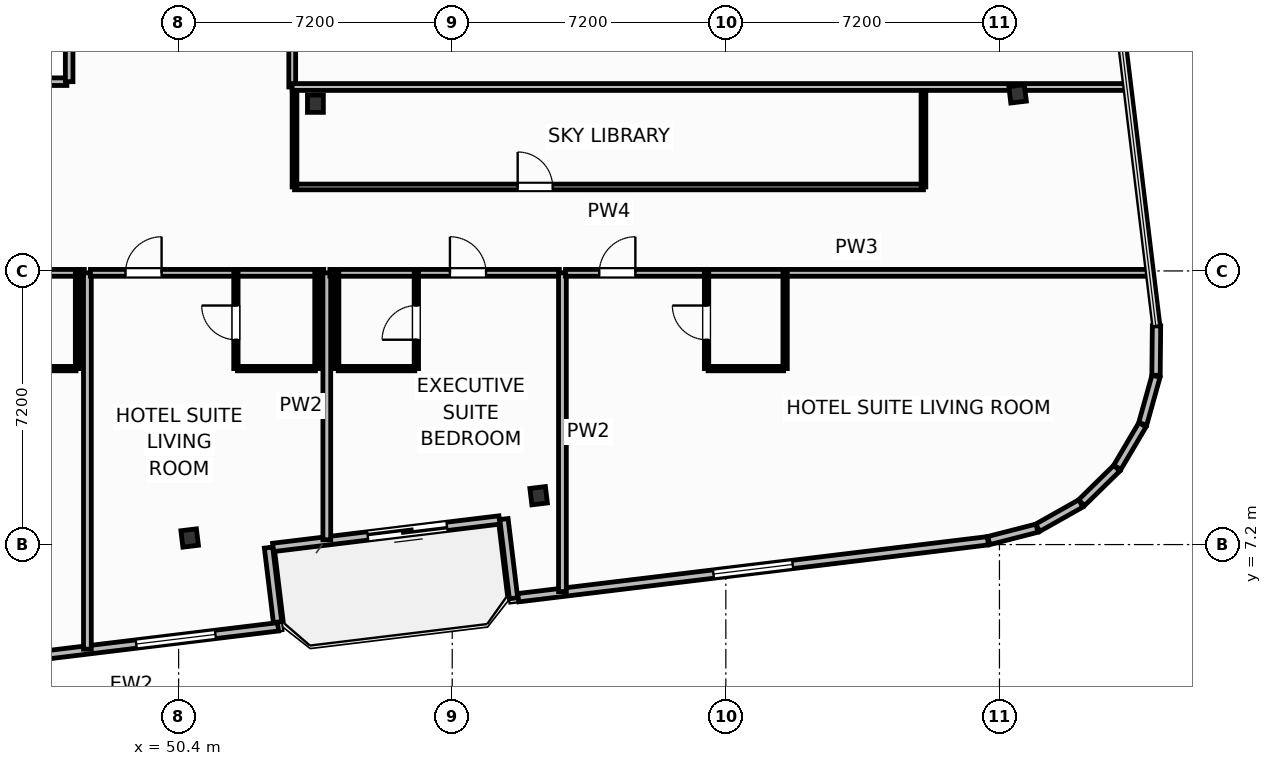
"""IFC4 building model, lengths in metres.
Left out: names, types, materials, properties, quantities, classifications, styles, units other than length and angle.
Written with IfcOpenShell. Run it as: python <this file> out.ifc"""

import sys

from ifc_helpers import new_model, si_unit, direction, frame, frame_2d, origin, origin_2d, place, context, subcontext, project, spatial, rectangle, i_section, extrude, element, fill, save


model = new_model("IFC4")
c1 = context("Model", 3, precision=1e-05, world=origin(), true_north=direction((0.0, 1.0)))
c2 = subcontext(c1, "Body", "Model", "MODEL_VIEW")
j1 = project(units=[si_unit("LENGTHUNIT", "METRE"), si_unit("PLANEANGLEUNIT", "RADIAN")], contexts=[c1])
p1 = place(None, origin())
s1 = spatial("IfcSite", under=j1, at=p1, CompositionType="ELEMENT")
p2 = place(p1, origin())
s2 = spatial("IfcBuilding", under=s1, at=p2, CompositionType="ELEMENT")
p3 = place(p2, frame((0.0, 0.0, 200.5)))
s3 = spatial("IfcBuildingStorey", under=s2, at=p3, CompositionType="ELEMENT", Elevation=200.5)
p4 = place(p3, frame((54.0, 18.8, 0.0), z_axis=(0.0, 0.0, 1.0), x_axis=(1.0, 0.0, 0.0)))
e1 = element("IfcColumn", 1, at=p4, inside=s3, PredefinedType="COLUMN", context=c2, shape_type="SweptSolid", body=[
    extrude(i_section(OverallWidth=0.418, OverallDepth=0.455, WebThickness=0.042, FlangeThickness=0.068, FilletRadius=0.025, at=origin_2d()), origin(), (0.0, 0.0, 1.0), 3.7),
])
for number, where, z_axis, x_axis in (
    (2, (50.691, 7.373, 0.0), (0.0, 0.0, 1.0), (0.993, 0.12, 0.0)),
    (3, (59.874, 8.486, 0.0), (0.0, 0.0, 1.0), (0.993, 0.12, 0.0)),
    (4, (72.477, 19.059, 0.0), (0.0, 0.0, 1.0), (0.993, 0.12, 0.0)),
):
    element("IfcColumn", number, at=place(p3, frame(where, z_axis=z_axis, x_axis=x_axis)), inside=s3, PredefinedType="COLUMN", context=c2, shape_type="SweptSolid", body=[
        extrude(i_section(OverallWidth=0.412, OverallDepth=0.435, WebThickness=0.036, FlangeThickness=0.057, FilletRadius=0.025, at=origin_2d()), origin(), (0.0, 0.0, 1.0), 3.7),
    ])
p5 = place(p3, frame((58.843, 7.847, 0.0), z_axis=(0.0, 0.0, 1.0), x_axis=(-0.992729951822, -0.120362962556, 0.0)))
e5 = element("IfcWall", 5, at=p5, inside=s3, PredefinedType="SOLIDWALL", context=c2, shape_type="SweptSolid", body=[
    extrude(rectangle(XDim=6.0, YDim=0.22, at=frame_2d((3.0, 0.0))), origin(), (0.0, 0.0, 1.0), 2.73),
])
p6 = place(p5, frame((1.392, 0.0, 0.0)))
e6 = element("IfcOpeningElement", 6, at=p6, cuts=e5, PredefinedType="OPENING", context=c2, shape_type="SweptSolid", body=[
    extrude(rectangle(XDim=2.1, YDim=2.3, at=frame_2d((1.05, 1.15))), frame((0.0, 0.12, 0.0), z_axis=(0.0, -1.0, 0.0), x_axis=(1.0, 0.0, 0.0)), (0.0, 0.0, 1.0), 0.24),
])
p7 = place(p3, frame((45.042, 4.069, 0.0), z_axis=(0.0, 0.0, 1.0), x_axis=(0.992731032022, 0.120354052946, 0.0)))
e7 = element("IfcWall", 7, at=p7, inside=s3, PredefinedType="SOLIDWALL", context=c2, shape_type="SweptSolid", body=[
    extrude(rectangle(XDim=8.035, YDim=0.22, at=frame_2d((4.018, 0.0))), origin(), (0.0, 0.0, 1.0), 2.73),
])
p8 = place(p7, frame((4.273, 0.0, 0.8)))
e8 = element("IfcOpeningElement", 8, at=p8, cuts=e7, PredefinedType="OPENING", context=c2, shape_type="SweptSolid", body=[
    extrude(rectangle(XDim=2.1, YDim=1.75, at=frame_2d((1.05, 0.875))), frame((0.0, 0.12, 0.0), z_axis=(0.0, -1.0, 0.0), x_axis=(1.0, 0.0, 0.0)), (0.0, 0.0, 1.0), 0.24),
])
p9 = place(p3, frame((53.004, 5.16, 0.0), z_axis=(0.0, 0.0, 1.0), x_axis=(-0.120397815541, 0.992725725472, 0.0)))
e9 = element("IfcWall", 9, at=p9, inside=s3, PredefinedType="SOLIDWALL", context=c2, shape_type="SweptSolid", body=[
    extrude(rectangle(XDim=1.975, YDim=0.22, at=frame_2d((0.988, 0.0))), origin(), (0.0, 0.0, 1.0), 2.73),
])
p10 = place(p3, frame((58.961, 7.872, 0.0), z_axis=(0.0, 0.0, 1.0), x_axis=(0.120327895535, -0.992734202874, 0.0)))
e10 = element("IfcWall", 10, at=p10, inside=s3, PredefinedType="SOLIDWALL", context=c2, shape_type="SweptSolid", body=[
    extrude(rectangle(XDim=2.1, YDim=0.22, at=frame_2d((1.05, 0.0))), origin(), (0.0, 0.0, 1.0), 2.73),
])
p11 = place(p3, frame((59.338, 5.802, 0.0), z_axis=(0.0, 0.0, 1.0), x_axis=(0.992731225757, 0.120352454927, 0.0)))
e11 = element("IfcWall", 11, at=p11, inside=s3, PredefinedType="SOLIDWALL", context=c2, shape_type="SweptSolid", body=[
    extrude(rectangle(XDim=12.447, YDim=0.22, at=frame_2d((6.224, 0.0))), origin(), (0.0, 0.0, 1.0), 2.73),
])
p12 = place(p11, frame((5.174, 0.0, 0.8)))
e12 = element("IfcOpeningElement", 12, at=p12, cuts=e11, PredefinedType="OPENING", context=c2, shape_type="SweptSolid", body=[
    extrude(rectangle(XDim=2.1, YDim=1.75, at=frame_2d((1.05, 0.875))), frame((0.0, 0.12, 0.0), z_axis=(0.0, -1.0, 0.0), x_axis=(1.0, 0.0, 0.0)), (0.0, 0.0, 1.0), 0.24),
])
p13 = place(p3, frame((71.719, 7.306, 0.0), z_axis=(0.0, 0.0, 1.0), x_axis=(0.968541764193, 0.248851061909, 0.0)))
e13 = element("IfcWall", 13, at=p13, inside=s3, PredefinedType="SOLIDWALL", context=c2, shape_type="SweptSolid", body=[
    extrude(rectangle(XDim=1.309, YDim=0.22, at=frame_2d((0.654, 0.0))), origin(), (0.0, 0.0, 1.0), 2.73),
])
for number, where, z_axis, x_axis in (
    (14, (73.008, 7.644, 0.0), (0.0, 0.0, 1.0), (0.871, 0.491, 0.0)),
    (15, (74.159, 8.3, 0.0), (0.0, 0.0, 1.0), (0.714, 0.7, 0.0)),
    (16, (75.101, 9.232, 0.0), (0.0, 0.0, 1.0), (0.509, 0.861, 0.0)),
    (17, (75.77, 10.376, 0.0), (0.0, 0.0, 1.0), (0.269, 0.963, 0.0)),
):
    element("IfcWall", number, at=place(p3, frame(where, z_axis=z_axis, x_axis=x_axis)), inside=s3, PredefinedType="SOLIDWALL", context=c2, shape_type="SweptSolid", body=[
        extrude(rectangle(XDim=1.301, YDim=0.22, at=frame_2d((0.65, 0.0))), origin(), (0.0, 0.0, 1.0), 2.73),
    ])
p14 = place(p3, frame((76.12, 11.654, 0.0), z_axis=(0.0, 0.0, 1.0), x_axis=(0.01032033607, 0.999946743914, 0.0)))
e18 = element("IfcWall", 18, at=p14, inside=s3, PredefinedType="SOLIDWALL", context=c2, shape_type="SweptSolid", body=[
    extrude(rectangle(XDim=1.301, YDim=0.22, at=frame_2d((0.65, 0.0))), origin(), (0.0, 0.0, 1.0), 2.73),
])
p15 = place(p3, frame((53.45, 16.61, 0.0), z_axis=(0.0, 0.0, 1.0), x_axis=(1.0, 0.0, 0.0)))
e19 = element("IfcWall", 19, at=p15, inside=s3, PredefinedType="PARTITIONING", context=c2, shape_type="SweptSolid", body=[
    extrude(rectangle(XDim=16.55, YDim=0.15, at=frame_2d((8.275, 0.0))), origin(), (0.0, 0.0, 1.0), 3.45),
])
p16 = place(p15, frame((5.873, 0.0, 0.0)))
e20 = element("IfcOpeningElement", 20, at=p16, cuts=e19, PredefinedType="OPENING", context=c2, shape_type="SweptSolid", body=[
    extrude(rectangle(XDim=0.92, YDim=2.05, at=frame_2d((0.46, 1.025))), frame((0.0, 0.085, 0.0), z_axis=(0.0, -1.0, 0.0), x_axis=(1.0, 0.0, 0.0)), (0.0, 0.0, 1.0), 0.17),
])
p17 = place(p3, frame((53.45, 16.61, 0.0), z_axis=(0.0, 0.0, 1.0), x_axis=(0.0, 1.0, 0.0)))
e21 = element("IfcWall", 21, at=p17, inside=s3, PredefinedType="PARTITIONING", context=c2, shape_type="SweptSolid", body=[
    extrude(rectangle(XDim=2.63, YDim=0.125, at=frame_2d((1.315, 0.0))), origin(), (0.0, 0.0, 1.0), 2.662),
])
p18 = place(p3, frame((70.0, 16.61, 0.0), z_axis=(0.0, 0.0, 1.0), x_axis=(0.0, 1.0, 0.0)))
e22 = element("IfcWall", 22, at=p18, inside=s3, PredefinedType="PARTITIONING", context=c2, shape_type="SweptSolid", body=[
    extrude(rectangle(XDim=2.63, YDim=0.125, at=frame_2d((1.315, 0.0))), origin(), (0.0, 0.0, 1.0), 3.45),
])
p19 = place(p3, frame((41.78, 14.35, 0.0), z_axis=(0.0, 0.0, 1.0), x_axis=(1.0, 0.0, 0.0)))
e23 = element("IfcWall", 23, at=p19, inside=s3, PredefinedType="PARTITIONING", context=c2, shape_type="SweptSolid", body=[
    extrude(rectangle(XDim=6.14, YDim=0.18, at=frame_2d((3.07, 0.0))), origin(), (0.0, 0.0, 1.0), 3.45),
])
p20 = place(p19, frame((0.922, 0.0, 0.0)))
e24 = element("IfcOpeningElement", 24, at=p20, cuts=e23, PredefinedType="OPENING", context=c2, shape_type="SweptSolid", body=[
    extrude(rectangle(XDim=0.95, YDim=2.15, at=frame_2d((0.475, 1.075))), frame((0.0, 0.1, 0.0), z_axis=(0.0, -1.0, 0.0), x_axis=(1.0, 0.0, 0.0)), (0.0, 0.0, 1.0), 0.2),
])
p21 = place(p3, frame((45.648, 11.83, 0.0), z_axis=(0.0, 0.0, 1.0), x_axis=(1.0, 0.0, 0.0)))
e25 = element("IfcWall", 25, at=p21, inside=s3, PredefinedType="PARTITIONING", context=c2, shape_type="SweptSolid", body=[
    extrude(rectangle(XDim=2.052, YDim=0.115, at=frame_2d((1.026, 0.0))), origin(), (0.0, 0.0, 1.0), 3.45),
])
p22 = place(p3, frame((47.74, 11.83, 0.0), z_axis=(0.0, 0.0, 1.0), x_axis=(0.0, 1.0, 0.0)))
e26 = element("IfcWall", 26, at=p22, inside=s3, PredefinedType="PARTITIONING", context=c2, shape_type="SweptSolid", body=[
    extrude(rectangle(XDim=2.52, YDim=0.115, at=frame_2d((1.26, 0.0))), origin(), (0.0, 0.0, 1.0), 3.45),
])
p23 = place(p3, frame((48.0, 4.448, 0.0), z_axis=(0.0, 0.0, 1.0), x_axis=(0.0, 1.0, 0.0)))
e27 = element("IfcWall", 27, at=p23, inside=s3, PredefinedType="PARTITIONING", context=c2, shape_type="SweptSolid", body=[
    extrude(rectangle(XDim=9.903, YDim=0.205, at=frame_2d((4.951, 0.0))), origin(), (0.0, 0.0, 1.0), 3.45),
])
p24 = place(p3, frame((48.08, 14.35, 0.0), z_axis=(0.0, 0.0, 1.0), x_axis=(1.0, 0.0, 0.0)))
e28 = element("IfcWall", 28, at=p24, inside=s3, PredefinedType="PARTITIONING", context=c2, shape_type="SweptSolid", body=[
    extrude(rectangle(XDim=6.14, YDim=0.18, at=frame_2d((3.07, 0.0))), origin(), (0.0, 0.0, 1.0), 3.45),
])
p25 = place(p24, frame((0.922, 0.0, 0.0)))
e29 = element("IfcOpeningElement", 29, at=p25, cuts=e28, PredefinedType="OPENING", context=c2, shape_type="SweptSolid", body=[
    extrude(rectangle(XDim=0.95, YDim=2.15, at=frame_2d((0.475, 1.075))), frame((0.0, 0.1, 0.0), z_axis=(0.0, -1.0, 0.0), x_axis=(1.0, 0.0, 0.0)), (0.0, 0.0, 1.0), 0.2),
])
p26 = place(p3, frame((51.948, 11.83, 0.0), z_axis=(0.0, 0.0, 1.0), x_axis=(1.0, 0.0, 0.0)))
e30 = element("IfcWall", 30, at=p26, inside=s3, PredefinedType="PARTITIONING", context=c2, shape_type="SweptSolid", body=[
    extrude(rectangle(XDim=2.052, YDim=0.115, at=frame_2d((1.026, 0.0))), origin(), (0.0, 0.0, 1.0), 3.45),
])
p27 = place(p3, frame((51.908, 11.83, 0.0), z_axis=(0.0, 0.0, 1.0), x_axis=(0.0, 1.0, 0.0)))
e31 = element("IfcWall", 31, at=p27, inside=s3, PredefinedType="PARTITIONING", context=c2, shape_type="SweptSolid", body=[
    extrude(rectangle(XDim=2.52, YDim=0.115, at=frame_2d((1.26, 0.0))), origin(), (0.0, 0.0, 1.0), 2.662),
])
p28 = place(p27, frame((0.76, 0.0, 0.0)))
e32 = element("IfcOpeningElement", 32, at=p28, cuts=e31, PredefinedType="OPENING", context=c2, shape_type="SweptSolid", body=[
    extrude(rectangle(XDim=0.9, YDim=2.05, at=frame_2d((0.45, 1.025))), frame((0.0, 0.067, 0.0), z_axis=(0.0, -1.0, 0.0), x_axis=(1.0, 0.0, 0.0)), (0.0, 0.0, 1.0), 0.135),
])
p29 = place(p3, frame((54.04, 11.83, 0.0), z_axis=(0.0, 0.0, 1.0), x_axis=(0.0, 1.0, 0.0)))
e33 = element("IfcWall", 33, at=p29, inside=s3, PredefinedType="PARTITIONING", context=c2, shape_type="SweptSolid", body=[
    extrude(rectangle(XDim=2.52, YDim=0.115, at=frame_2d((1.26, 0.0))), origin(), (0.0, 0.0, 1.0), 3.45),
])
p30 = place(p3, frame((54.3, 7.326, 0.0), z_axis=(0.0, 0.0, 1.0), x_axis=(0.0, 1.0, 0.0)))
e34 = element("IfcWall", 34, at=p30, inside=s3, PredefinedType="PARTITIONING", context=c2, shape_type="SweptSolid", body=[
    extrude(rectangle(XDim=7.024, YDim=0.205, at=frame_2d((3.512, 0.0))), origin(), (0.0, 0.0, 1.0), 3.45),
])
p31 = place(p3, frame((54.38, 14.35, 0.0), z_axis=(0.0, 0.0, 1.0), x_axis=(1.0, 0.0, 0.0)))
e35 = element("IfcWall", 35, at=p31, inside=s3, PredefinedType="PARTITIONING", context=c2, shape_type="SweptSolid", body=[
    extrude(rectangle(XDim=6.04, YDim=0.18, at=frame_2d((3.02, 0.0))), origin(), (0.0, 0.0, 1.0), 3.45),
])
p32 = place(p31, frame((3.16, 0.0, 0.0)))
e36 = element("IfcOpeningElement", 36, at=p32, cuts=e35, PredefinedType="OPENING", context=c2, shape_type="SweptSolid", body=[
    extrude(rectangle(XDim=0.95, YDim=2.15, at=frame_2d((0.475, 1.075))), frame((0.0, 0.1, 0.0), z_axis=(0.0, -1.0, 0.0), x_axis=(1.0, 0.0, 0.0)), (0.0, 0.0, 1.0), 0.2),
])
p33 = place(p3, frame((54.6, 11.83, 0.0), z_axis=(0.0, 0.0, 1.0), x_axis=(1.0, 0.0, 0.0)))
e37 = element("IfcWall", 37, at=p33, inside=s3, PredefinedType="PARTITIONING", context=c2, shape_type="SweptSolid", body=[
    extrude(rectangle(XDim=2.016, YDim=0.115, at=frame_2d((1.008, 0.0))), origin(), (0.0, 0.0, 1.0), 3.45),
])
p34 = place(p3, frame((56.656, 11.83, 0.0), z_axis=(0.0, 0.0, 1.0), x_axis=(0.0, 1.0, 0.0)))
e38 = element("IfcWall", 38, at=p34, inside=s3, PredefinedType="PARTITIONING", context=c2, shape_type="SweptSolid", body=[
    extrude(rectangle(XDim=2.52, YDim=0.115, at=frame_2d((1.26, 0.0))), origin(), (0.0, 0.0, 1.0), 3.45),
])
p35 = place(p34, frame((0.76, 0.0, 0.0)))
e39 = element("IfcOpeningElement", 39, at=p35, cuts=e38, PredefinedType="OPENING", context=c2, shape_type="SweptSolid", body=[
    extrude(rectangle(XDim=0.9, YDim=2.05, at=frame_2d((0.45, 1.025))), frame((0.0, 0.067, 0.0), z_axis=(0.0, -1.0, 0.0), x_axis=(1.0, 0.0, 0.0)), (0.0, 0.0, 1.0), 0.135),
])
p36 = place(p3, frame((54.56, 11.83, 0.0), z_axis=(0.0, 0.0, 1.0), x_axis=(0.0, 1.0, 0.0)))
e40 = element("IfcWall", 40, at=p36, inside=s3, PredefinedType="PARTITIONING", context=c2, shape_type="SweptSolid", body=[
    extrude(rectangle(XDim=2.52, YDim=0.115, at=frame_2d((1.26, 0.0))), origin(), (0.0, 0.0, 1.0), 3.45),
])
p37 = place(p3, frame((60.5, 5.963, 0.0), z_axis=(0.0, 0.0, 1.0), x_axis=(0.0, 1.0, 0.0)))
e41 = element("IfcWall", 41, at=p37, inside=s3, PredefinedType="PARTITIONING", context=c2, shape_type="SweptSolid", body=[
    extrude(rectangle(XDim=8.387, YDim=0.205, at=frame_2d((4.194, 0.0))), origin(), (0.0, 0.0, 1.0), 3.45),
])
p38 = place(p3, frame((60.58, 14.35, 0.0), z_axis=(0.0, 0.0, 1.0), x_axis=(1.0, 0.0, 0.0)))
e42 = element("IfcWall", 42, at=p38, inside=s3, PredefinedType="PARTITIONING", context=c2, shape_type="SweptSolid", body=[
    extrude(rectangle(XDim=15.325, YDim=0.18, at=frame_2d((7.662, 0.0))), origin(), (0.0, 0.0, 1.0), 3.45),
])
p39 = place(p38, frame((0.889, 0.0, 0.0)))
e43 = element("IfcOpeningElement", 43, at=p39, cuts=e42, PredefinedType="OPENING", context=c2, shape_type="SweptSolid", body=[
    extrude(rectangle(XDim=0.95, YDim=2.15, at=frame_2d((0.475, 1.075))), frame((0.0, 0.1, 0.0), z_axis=(0.0, -1.0, 0.0), x_axis=(1.0, 0.0, 0.0)), (0.0, 0.0, 1.0), 0.2),
])
p40 = place(p3, frame((64.333, 11.83, 0.0), z_axis=(0.0, 0.0, 1.0), x_axis=(1.0, 0.0, 0.0)))
e44 = element("IfcWall", 44, at=p40, inside=s3, PredefinedType="PARTITIONING", context=c2, shape_type="SweptSolid", body=[
    extrude(rectangle(XDim=1.987, YDim=0.115, at=frame_2d((0.994, 0.0))), origin(), (0.0, 0.0, 1.0), 3.45),
])
p41 = place(p3, frame((64.293, 11.83, 0.0), z_axis=(0.0, 0.0, 1.0), x_axis=(0.0, 1.0, 0.0)))
e45 = element("IfcWall", 45, at=p41, inside=s3, PredefinedType="PARTITIONING", context=c2, shape_type="SweptSolid", body=[
    extrude(rectangle(XDim=2.52, YDim=0.115, at=frame_2d((1.26, 0.0))), origin(), (0.0, 0.0, 1.0), 3.45),
])
p42 = place(p41, frame((0.76, 0.0, 0.0)))
e46 = element("IfcOpeningElement", 46, at=p42, cuts=e45, PredefinedType="OPENING", context=c2, shape_type="SweptSolid", body=[
    extrude(rectangle(XDim=0.9, YDim=2.05, at=frame_2d((0.45, 1.025))), frame((0.0, 0.067, 0.0), z_axis=(0.0, -1.0, 0.0), x_axis=(1.0, 0.0, 0.0)), (0.0, 0.0, 1.0), 0.135),
])
p43 = place(p3, frame((66.36, 11.83, 0.0), z_axis=(0.0, 0.0, 1.0), x_axis=(0.0, 1.0, 0.0)))
e47 = element("IfcWall", 47, at=p43, inside=s3, PredefinedType="PARTITIONING", context=c2, shape_type="SweptSolid", body=[
    extrude(rectangle(XDim=2.52, YDim=0.115, at=frame_2d((1.26, 0.0))), origin(), (0.0, 0.0, 1.0), 3.45),
])
p44 = place(p3, frame((53.39, 19.24, 0.0), z_axis=(0.0, 0.0, 1.0), x_axis=(0.0, 1.0, 0.0)))
e48 = element("IfcWall", 48, at=p44, inside=s3, PredefinedType="PARTITIONING", context=c2, shape_type="SweptSolid", body=[
    extrude(rectangle(XDim=20.06, YDim=0.18, at=frame_2d((10.03, 0.0))), origin(), (0.0, 0.0, 1.0), 3.45),
])
p45 = place(p44, frame((7.7, 0.0, 0.0)))
e49 = element("IfcOpeningElement", 49, at=p45, cuts=e48, PredefinedType="OPENING", context=c2, shape_type="SweptSolid", body=[
    extrude(rectangle(XDim=0.95, YDim=2.05, at=frame_2d((0.475, 1.025))), frame((0.0, 0.1, 0.0), z_axis=(0.0, -1.0, 0.0), x_axis=(1.0, 0.0, 0.0)), (0.0, 0.0, 1.0), 0.2),
])
p46 = place(p3, frame((53.39, 19.24, 0.0), z_axis=(0.0, 0.0, 1.0), x_axis=(1.0, 0.0, 0.0)))
e50 = element("IfcWall", 50, at=p46, inside=s3, PredefinedType="PARTITIONING", context=c2, shape_type="SweptSolid", body=[
    extrude(rectangle(XDim=21.922, YDim=0.18, at=frame_2d((10.961, 0.0))), origin(), (0.0, 0.0, 1.0), 2.662),
])
p47 = place(p3, frame((45.24, 19.38, 0.0), z_axis=(0.0, 0.0, 1.0), x_axis=(1.0, 0.0, 0.0)))
e51 = element("IfcWall", 51, at=p47, inside=s3, PredefinedType="PARTITIONING", context=c2, shape_type="SweptSolid", body=[
    extrude(rectangle(XDim=2.22, YDim=0.2, at=frame_2d((1.11, 0.0))), origin(), (0.0, 0.0, 1.0), 2.662),
])
p48 = place(p3, frame((47.52, 19.38, 0.0), z_axis=(0.0, 0.0, 1.0), x_axis=(0.0, 1.0, 0.0)))
e52 = element("IfcWall", 52, at=p48, inside=s3, PredefinedType="PARTITIONING", context=c2, shape_type="SweptSolid", body=[
    extrude(rectangle(XDim=6.9, YDim=0.2, at=frame_2d((3.45, 0.0))), origin(), (0.0, 0.0, 1.0), 3.45),
])
p49 = place(p6, origin())
e53 = element("IfcDoor", 53, at=p49, inside=s3, OperationType="SLIDING_TO_LEFT", PredefinedType="DOOR", context=c2, shape_type="SweptSolid", body=[
    extrude(rectangle(XDim=2.1, YDim=2.3, at=frame_2d((1.05, 1.15))), frame((0.0, 0.025, 0.0), z_axis=(0.0, -1.0, 0.0), x_axis=(1.0, 0.0, 0.0)), (0.0, 0.0, 1.0), 0.05),
])
fill(e6, e53)
p50 = place(p8, origin())
e54 = element("IfcWindow", 54, at=p50, inside=s3, PartitioningType="SINGLE_PANEL", PredefinedType="WINDOW", context=c2, shape_type="SweptSolid", body=[
    extrude(rectangle(XDim=2.1, YDim=1.75, at=frame_2d((1.05, 0.875))), frame((0.0, 0.03, 0.0), z_axis=(0.0, -1.0, 0.0), x_axis=(1.0, 0.0, 0.0)), (0.0, 0.0, 1.0), 0.06),
])
fill(e8, e54)
p51 = place(p12, origin())
e55 = element("IfcWindow", 55, at=p51, inside=s3, PartitioningType="SINGLE_PANEL", PredefinedType="WINDOW", context=c2, shape_type="SweptSolid", body=[
    extrude(rectangle(XDim=2.1, YDim=1.75, at=frame_2d((1.05, 0.875))), frame((0.0, 0.03, 0.0), z_axis=(0.0, -1.0, 0.0), x_axis=(1.0, 0.0, 0.0)), (0.0, 0.0, 1.0), 0.06),
])
fill(e12, e55)
p52 = place(p16, origin())
e56 = element("IfcDoor", 56, at=p52, inside=s3, OperationType="SINGLE_SWING_LEFT", PredefinedType="DOOR", context=c2, shape_type="SweptSolid", body=[
    extrude(rectangle(XDim=0.92, YDim=2.05, at=frame_2d((0.46, 1.025))), frame((0.0, 0.025, 0.0), z_axis=(0.0, -1.0, 0.0), x_axis=(1.0, 0.0, 0.0)), (0.0, 0.0, 1.0), 0.05),
])
fill(e20, e56)
p53 = place(p25, origin())
e57 = element("IfcDoor", 57, at=p53, inside=s3, OperationType="SINGLE_SWING_RIGHT", PredefinedType="DOOR", context=c2, shape_type="SweptSolid", body=[
    extrude(rectangle(XDim=0.95, YDim=2.15, at=frame_2d((0.475, 1.075))), frame((0.0, 0.025, 0.0), z_axis=(0.0, -1.0, 0.0), x_axis=(1.0, 0.0, 0.0)), (0.0, 0.0, 1.0), 0.05),
])
fill(e29, e57)
p54 = place(p28, origin())
e58 = element("IfcDoor", 58, at=p54, inside=s3, OperationType="SINGLE_SWING_RIGHT", PredefinedType="DOOR", context=c2, shape_type="SweptSolid", body=[
    extrude(rectangle(XDim=0.9, YDim=2.05, at=frame_2d((0.45, 1.025))), frame((0.0, 0.025, 0.0), z_axis=(0.0, -1.0, 0.0), x_axis=(1.0, 0.0, 0.0)), (0.0, 0.0, 1.0), 0.05),
])
fill(e32, e58)
p55 = place(p32, origin())
e59 = element("IfcDoor", 59, at=p55, inside=s3, OperationType="SINGLE_SWING_LEFT", PredefinedType="DOOR", context=c2, shape_type="SweptSolid", body=[
    extrude(rectangle(XDim=0.95, YDim=2.15, at=frame_2d((0.475, 1.075))), frame((0.0, 0.025, 0.0), z_axis=(0.0, -1.0, 0.0), x_axis=(1.0, 0.0, 0.0)), (0.0, 0.0, 1.0), 0.05),
])
fill(e36, e59)
p56 = place(p35, origin())
e60 = element("IfcDoor", 60, at=p56, inside=s3, OperationType="SINGLE_SWING_LEFT", PredefinedType="DOOR", context=c2, shape_type="SweptSolid", body=[
    extrude(rectangle(XDim=0.9, YDim=2.05, at=frame_2d((0.45, 1.025))), frame((0.0, 0.025, 0.0), z_axis=(0.0, -1.0, 0.0), x_axis=(1.0, 0.0, 0.0)), (0.0, 0.0, 1.0), 0.05),
])
fill(e39, e60)
p57 = place(p39, origin())
e61 = element("IfcDoor", 61, at=p57, inside=s3, OperationType="SINGLE_SWING_RIGHT", PredefinedType="DOOR", context=c2, shape_type="SweptSolid", body=[
    extrude(rectangle(XDim=0.95, YDim=2.15, at=frame_2d((0.475, 1.075))), frame((0.0, 0.025, 0.0), z_axis=(0.0, -1.0, 0.0), x_axis=(1.0, 0.0, 0.0)), (0.0, 0.0, 1.0), 0.05),
])
fill(e43, e61)
p58 = place(p42, origin())
e62 = element("IfcDoor", 62, at=p58, inside=s3, OperationType="SINGLE_SWING_RIGHT", PredefinedType="DOOR", context=c2, shape_type="SweptSolid", body=[
    extrude(rectangle(XDim=0.9, YDim=2.05, at=frame_2d((0.45, 1.025))), frame((0.0, 0.025, 0.0), z_axis=(0.0, -1.0, 0.0), x_axis=(1.0, 0.0, 0.0)), (0.0, 0.0, 1.0), 0.05),
])
fill(e46, e62)
save(model, sys.argv[1])
